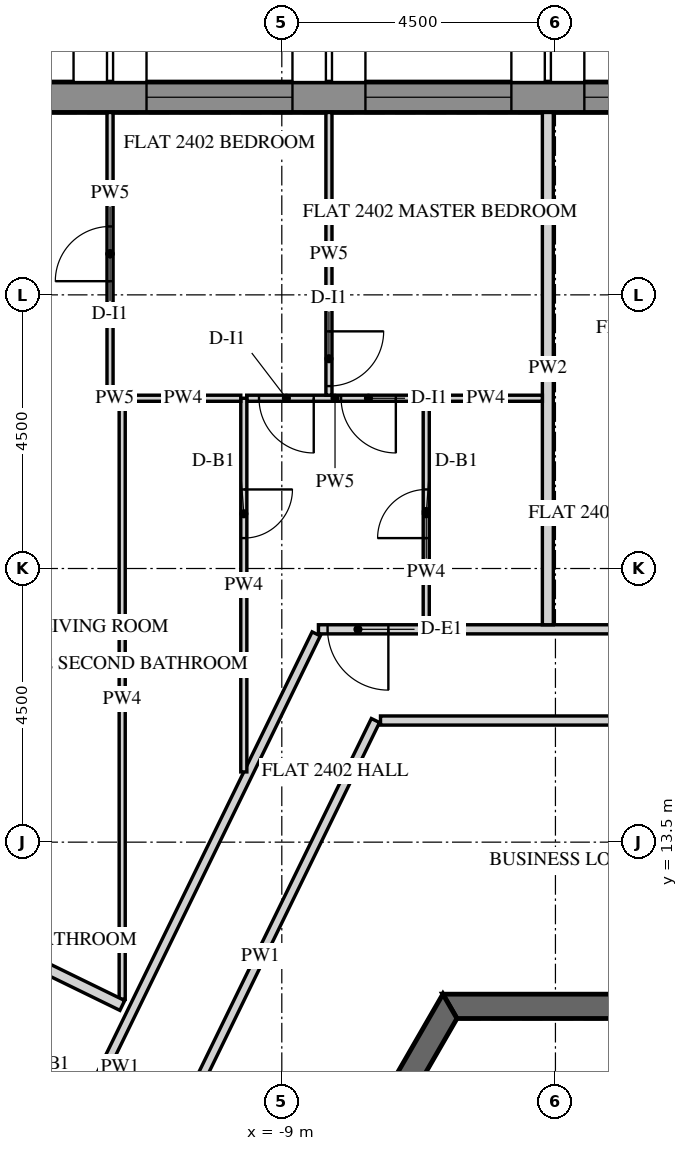
"""IFC4 building model, lengths in metres.
Left out: names, types, materials, properties, quantities, classifications, styles, units other than length and angle.
Written with IfcOpenShell. Run it as: python <this file> out.ifc"""

import sys

from ifc_helpers import new_model, si_unit, direction, frame, frame_2d, origin, place, context, subcontext, project, spatial, polyline, rectangle, outline, extrude, element, fill, save


model = new_model("IFC4")
c1 = context("Model", 3, precision=1e-05, world=origin(), true_north=direction((0.0, 1.0)))
c2 = subcontext(c1, "Body", "Model", "MODEL_VIEW")
j1 = project(units=[si_unit("LENGTHUNIT", "METRE"), si_unit("PLANEANGLEUNIT", "RADIAN")], contexts=[c1])
p1 = place(None, origin())
s1 = spatial("IfcSite", under=j1, at=p1, CompositionType="ELEMENT")
p2 = place(p1, origin())
s2 = spatial("IfcBuilding", under=s1, at=p2, CompositionType="ELEMENT")
p3 = place(p2, frame((0.0, 0.0, 303.0)))
s3 = spatial("IfcBuildingStorey", under=s2, at=p3, CompositionType="ELEMENT", Elevation=303.0)
p4 = place(p3, frame((11.698, 25.75, -0.15), z_axis=(0.0, 0.0, 1.0), x_axis=(-1.0, 0.0, 0.0)))
e1 = element("IfcWall", 1, at=p4, inside=s3, PredefinedType="SOLIDWALL", context=c2, shape_type="SweptSolid", body=[
    extrude(outline(polyline([(-0.021, -0.25), (25.468, -0.25), (25.421, 0.25), (0.021, 0.25), (-0.021, -0.25)])), origin(), (0.0, 0.0, 1.0), 3.9),
])
p5 = place(p4, frame((2.522, 0.0, 0.75)))
e2 = element("IfcOpeningElement", 2, at=p5, cuts=e1, PredefinedType="OPENING", context=c2, shape_type="SweptSolid", body=[
    extrude(rectangle(XDim=2.4, YDim=2.7, at=frame_2d((1.2, 1.35))), frame((0.0, 0.26, 0.0), z_axis=(0.0, -1.0, 0.0), x_axis=(1.0, 0.0, 0.0)), (0.0, 0.0, 1.0), 0.52),
])
p6 = place(p4, frame((6.122, 0.0, 0.75)))
e3 = element("IfcOpeningElement", 3, at=p6, cuts=e1, PredefinedType="OPENING", context=c2, shape_type="SweptSolid", body=[
    extrude(rectangle(XDim=2.4, YDim=2.7, at=frame_2d((1.2, 1.35))), frame((0.0, 0.26, 0.0), z_axis=(0.0, -1.0, 0.0), x_axis=(1.0, 0.0, 0.0)), (0.0, 0.0, 1.0), 0.52),
])
p7 = place(p4, frame((9.722, 0.0, 0.75)))
e4 = element("IfcOpeningElement", 4, at=p7, cuts=e1, PredefinedType="OPENING", context=c2, shape_type="SweptSolid", body=[
    extrude(rectangle(XDim=2.4, YDim=2.7, at=frame_2d((1.2, 1.35))), frame((0.0, 0.26, 0.0), z_axis=(0.0, -1.0, 0.0), x_axis=(1.0, 0.0, 0.0)), (0.0, 0.0, 1.0), 0.52),
])
p8 = place(p4, frame((13.323, 0.0, 0.75)))
e5 = element("IfcOpeningElement", 5, at=p8, cuts=e1, PredefinedType="OPENING", context=c2, shape_type="SweptSolid", body=[
    extrude(rectangle(XDim=2.4, YDim=2.7, at=frame_2d((1.2, 1.35))), frame((0.0, 0.26, 0.0), z_axis=(0.0, -1.0, 0.0), x_axis=(1.0, 0.0, 0.0)), (0.0, 0.0, 1.0), 0.52),
])
p9 = place(p4, frame((16.922, 0.0, 0.75)))
e6 = element("IfcOpeningElement", 6, at=p9, cuts=e1, PredefinedType="OPENING", context=c2, shape_type="SweptSolid", body=[
    extrude(rectangle(XDim=2.4, YDim=2.7, at=frame_2d((1.2, 1.35))), frame((0.0, 0.26, 0.0), z_axis=(0.0, -1.0, 0.0), x_axis=(1.0, 0.0, 0.0)), (0.0, 0.0, 1.0), 0.52),
])
p10 = place(p4, frame((20.522, 0.0, 0.75)))
e7 = element("IfcOpeningElement", 7, at=p10, cuts=e1, PredefinedType="OPENING", context=c2, shape_type="SweptSolid", body=[
    extrude(rectangle(XDim=2.4, YDim=2.7, at=frame_2d((1.2, 1.35))), frame((0.0, 0.26, 0.0), z_axis=(0.0, -1.0, 0.0), x_axis=(1.0, 0.0, 0.0)), (0.0, 0.0, 1.0), 0.52),
])
p11 = place(p3, frame((-6.235, 10.8, -0.15), z_axis=(0.0, 0.0, 1.0), x_axis=(-0.499996419489, -0.866027470984, 0.0)))
e8 = element("IfcWall", 8, at=p11, inside=s3, PredefinedType="SHEAR", context=c2, shape_type="SweptSolid", body=[
    extrude(outline(polyline([(-0.115, -0.2), (12.586, -0.2), (12.355, 0.2), (0.115, 0.2), (-0.115, -0.2)])), origin(), (0.0, 0.0, 1.0), 3.9),
])
p12 = place(p11, frame((5.364, 0.0, 0.15)))
e9 = element("IfcOpeningElement", 9, at=p12, cuts=e8, PredefinedType="OPENING", context=c2, shape_type="SweptSolid", body=[
    extrude(rectangle(XDim=1.8, YDim=2.4, at=frame_2d((0.9, 1.2))), frame((0.0, 0.21, 0.0), z_axis=(0.0, -1.0, 0.0), x_axis=(1.0, 0.0, 0.0)), (0.0, 0.0, 1.0), 0.42),
])
p13 = place(p3, frame((6.235, 10.8, -0.15), z_axis=(0.0, 0.0, 1.0), x_axis=(-1.0, 0.0, 0.0)))
e10 = element("IfcWall", 10, at=p13, inside=s3, PredefinedType="SHEAR", context=c2, shape_type="SweptSolid", body=[
    extrude(outline(polyline([(-0.115, -0.2), (12.586, -0.2), (12.355, 0.2), (0.115, 0.2), (-0.115, -0.2)])), origin(), (0.0, 0.0, 1.0), 3.9),
])
p14 = place(p3, frame((6.552, 17.0, 0.0), z_axis=(0.0, 0.0, 1.0), x_axis=(-1.0, 0.0, 0.0)))
e11 = element("IfcWall", 11, at=p14, inside=s3, PredefinedType="PARTITIONING", context=c2, shape_type="SweptSolid", body=[
    extrude(rectangle(XDim=14.949, YDim=0.15, at=frame_2d((7.475, 0.0))), origin(), (0.0, 0.0, 1.0), 2.988),
])
p15 = place(p14, frame((2.725, 0.0, 0.0)))
e12 = element("IfcOpeningElement", 12, at=p15, cuts=e11, PredefinedType="OPENING", context=c2, shape_type="SweptSolid", body=[
    extrude(rectangle(XDim=1.0, YDim=2.1, at=frame_2d((0.5, 1.05))), frame((0.0, 0.085, 0.0), z_axis=(0.0, -1.0, 0.0), x_axis=(1.0, 0.0, 0.0)), (0.0, 0.0, 1.0), 0.17),
])
p16 = place(p14, frame((13.799, 0.0, 0.0)))
e13 = element("IfcOpeningElement", 13, at=p16, cuts=e11, PredefinedType="OPENING", context=c2, shape_type="SweptSolid", body=[
    extrude(rectangle(XDim=1.0, YDim=2.1, at=frame_2d((0.5, 1.05))), frame((0.0, 0.085, 0.0), z_axis=(0.0, -1.0, 0.0), x_axis=(1.0, 0.0, 0.0)), (0.0, 0.0, 1.0), 0.17),
])
p17 = place(p3, frame((-8.434, 16.925, 0.0), z_axis=(0.0, 0.0, 1.0), x_axis=(-0.438371383278, -0.898793930956, 0.0)))
e14 = element("IfcWall", 14, at=p17, inside=s3, PredefinedType="PARTITIONING", context=c2, shape_type="SweptSolid", body=[
    extrude(rectangle(XDim=16.939, YDim=0.15, at=frame_2d((8.47, 0.0))), origin(), (0.0, 0.0, 1.0), 2.988),
])
p18 = place(p17, frame((9.89, 0.0, 0.0)))
e15 = element("IfcOpeningElement", 15, at=p18, cuts=e14, PredefinedType="OPENING", context=c2, shape_type="SweptSolid", body=[
    extrude(rectangle(XDim=1.0, YDim=2.1, at=frame_2d((0.5, 1.05))), frame((0.0, 0.085, 0.0), z_axis=(0.0, -1.0, 0.0), x_axis=(1.0, 0.0, 0.0)), (0.0, 0.0, 1.0), 0.17),
])
p19 = place(p3, frame((-11.238, 7.754, 0.0), z_axis=(0.0, 0.0, 1.0), x_axis=(0.438387352899, 0.89878614187, 0.0)))
e16 = element("IfcWall", 16, at=p19, inside=s3, PredefinedType="PARTITIONING", context=c2, shape_type="SweptSolid", body=[
    extrude(rectangle(XDim=8.618, YDim=0.15, at=frame_2d((4.309, 0.0))), origin(), (0.0, 0.0, 1.0), 2.988),
])
p20 = place(p3, frame((-7.377, 15.5, 0.0), z_axis=(0.0, 0.0, 1.0), x_axis=(1.0, 0.0, 0.0)))
e17 = element("IfcWall", 17, at=p20, inside=s3, PredefinedType="PARTITIONING", context=c2, shape_type="SweptSolid", body=[
    extrude(rectangle(XDim=13.206, YDim=0.15, at=frame_2d((6.603, 0.0))), origin(), (0.0, 0.0, 1.0), 2.988),
])
p21 = place(p20, frame((6.153, 0.0, 0.0)))
e18 = element("IfcOpeningElement", 18, at=p21, cuts=e17, PredefinedType="OPENING", context=c2, shape_type="SweptSolid", body=[
    extrude(rectangle(XDim=0.9, YDim=2.1, at=frame_2d((0.45, 1.05))), frame((0.0, 0.085, 0.0), z_axis=(0.0, -1.0, 0.0), x_axis=(1.0, 0.0, 0.0)), (0.0, 0.0, 1.0), 0.17),
])
p22 = place(p3, frame((-4.625, 25.5, 0.0), z_axis=(0.0, 0.0, 1.0), x_axis=(0.0, -1.0, 0.0)))
e19 = element("IfcWall", 19, at=p22, inside=s3, PredefinedType="PARTITIONING", context=c2, shape_type="SweptSolid", body=[
    extrude(rectangle(XDim=8.425, YDim=0.18, at=frame_2d((4.212, 0.0))), origin(), (0.0, 0.0, 1.0), 2.988),
])
p23 = place(p3, frame((-11.673, 20.8, 0.0), z_axis=(0.0, 0.0, 1.0), x_axis=(-1.0, 0.0, 0.0)))
e20 = element("IfcWall", 20, at=p23, inside=s3, PredefinedType="PARTITIONING", context=c2, shape_type="SweptSolid", body=[
    extrude(rectangle(XDim=0.152, YDim=0.1, at=frame_2d((0.076, 0.0))), origin(), (0.0, 0.0, 1.0), 2.988),
])
p24 = place(p3, frame((-11.825, 20.85, 0.0), z_axis=(0.0, 0.0, 1.0), x_axis=(0.0, 1.0, 0.0)))
e21 = element("IfcWall", 21, at=p24, inside=s3, PredefinedType="PARTITIONING", context=c2, shape_type="SweptSolid", body=[
    extrude(rectangle(XDim=4.65, YDim=0.1, at=frame_2d((2.325, 0.0))), origin(), (0.0, 0.0, 1.0), 2.988),
])
p25 = place(p24, frame((1.875, 0.0, 0.0)))
e22 = element("IfcOpeningElement", 22, at=p25, cuts=e21, PredefinedType="OPENING", context=c2, shape_type="SweptSolid", body=[
    extrude(rectangle(XDim=0.9, YDim=2.1, at=frame_2d((0.45, 1.05))), frame((0.0, 0.06, 0.0), z_axis=(0.0, -1.0, 0.0), x_axis=(1.0, 0.0, 0.0)), (0.0, 0.0, 1.0), 0.12),
])
p26 = place(p3, frame((-11.625, 10.915, 0.0), z_axis=(0.0, 0.0, 1.0), x_axis=(0.0, 1.0, 0.0)))
e23 = element("IfcWall", 23, at=p26, inside=s3, PredefinedType="PARTITIONING", context=c2, shape_type="SweptSolid", body=[
    extrude(rectangle(XDim=9.885, YDim=0.1, at=frame_2d((4.942, 0.0))), origin(), (0.0, 0.0, 1.0), 2.988),
])
p27 = place(p3, frame((-19.094, 14.458, 0.0), z_axis=(0.0, 0.0, 1.0), x_axis=(0.898789332666, -0.438380811038, 0.0)))
e24 = element("IfcWall", 24, at=p27, inside=s3, PredefinedType="PARTITIONING", context=c2, shape_type="SweptSolid", body=[
    extrude(rectangle(XDim=8.312, YDim=0.18, at=frame_2d((4.156, 0.0))), origin(), (0.0, 0.0, 1.0), 2.988),
])
p28 = place(p3, frame((-6.625, 17.075, 0.0), z_axis=(0.0, 0.0, 1.0), x_axis=(0.0, 1.0, 0.0)))
e25 = element("IfcWall", 25, at=p28, inside=s3, PredefinedType="PARTITIONING", context=c2, shape_type="SweptSolid", body=[
    extrude(rectangle(XDim=3.725, YDim=0.1, at=frame_2d((1.863, 0.0))), origin(), (0.0, 0.0, 1.0), 2.988),
])
p29 = place(p28, frame((1.425, 0.0, 0.0)))
e26 = element("IfcOpeningElement", 26, at=p29, cuts=e25, PredefinedType="OPENING", context=c2, shape_type="SweptSolid", body=[
    extrude(rectangle(XDim=0.8, YDim=2.1, at=frame_2d((0.4, 1.05))), frame((0.0, 0.06, 0.0), z_axis=(0.0, -1.0, 0.0), x_axis=(1.0, 0.0, 0.0)), (0.0, 0.0, 1.0), 0.12),
])
p30 = place(p3, frame((-6.673, 20.8, 0.0), z_axis=(0.0, 0.0, 1.0), x_axis=(-1.0, 0.0, 0.0)))
e27 = element("IfcWall", 27, at=p30, inside=s3, PredefinedType="PARTITIONING", context=c2, shape_type="SweptSolid", body=[
    extrude(rectangle(XDim=2.904, YDim=0.1, at=frame_2d((1.452, 0.0))), origin(), (0.0, 0.0, 1.0), 2.988),
])
p31 = place(p30, frame((0.452, 0.0, 0.0)))
e28 = element("IfcOpeningElement", 28, at=p31, cuts=e27, PredefinedType="OPENING", context=c2, shape_type="SweptSolid", body=[
    extrude(rectangle(XDim=0.9, YDim=2.1, at=frame_2d((0.45, 1.05))), frame((0.0, 0.06, 0.0), z_axis=(0.0, -1.0, 0.0), x_axis=(1.0, 0.0, 0.0)), (0.0, 0.0, 1.0), 0.12),
])
p32 = place(p30, frame((1.802, 0.0, 0.0)))
e29 = element("IfcOpeningElement", 29, at=p32, cuts=e27, PredefinedType="OPENING", context=c2, shape_type="SweptSolid", body=[
    extrude(rectangle(XDim=0.9, YDim=2.1, at=frame_2d((0.45, 1.05))), frame((0.0, 0.06, 0.0), z_axis=(0.0, -1.0, 0.0), x_axis=(1.0, 0.0, 0.0)), (0.0, 0.0, 1.0), 0.12),
])
p33 = place(p3, frame((-9.625, 20.8, 0.0), z_axis=(0.0, 0.0, 1.0), x_axis=(0.0, -1.0, 0.0)))
e30 = element("IfcWall", 30, at=p33, inside=s3, PredefinedType="PARTITIONING", context=c2, shape_type="SweptSolid", body=[
    extrude(rectangle(XDim=6.145, YDim=0.1, at=frame_2d((3.073, 0.0))), origin(), (0.0, 0.0, 1.0), 2.988),
])
p34 = place(p33, frame((1.5, 0.0, 0.0)))
e31 = element("IfcOpeningElement", 31, at=p34, cuts=e30, PredefinedType="OPENING", context=c2, shape_type="SweptSolid", body=[
    extrude(rectangle(XDim=0.8, YDim=2.1, at=frame_2d((0.4, 1.05))), frame((0.0, 0.06, 0.0), z_axis=(0.0, -1.0, 0.0), x_axis=(1.0, 0.0, 0.0)), (0.0, 0.0, 1.0), 0.12),
])
p35 = place(p3, frame((-4.715, 20.8, 0.0), z_axis=(0.0, 0.0, 1.0), x_axis=(-1.0, 0.0, 0.0)))
e32 = element("IfcWall", 32, at=p35, inside=s3, PredefinedType="PARTITIONING", context=c2, shape_type="SweptSolid", body=[
    extrude(rectangle(XDim=1.862, YDim=0.1, at=frame_2d((0.931, 0.0))), origin(), (0.0, 0.0, 1.0), 2.988),
])
p36 = place(p3, frame((-8.225, 25.5, 0.0), z_axis=(0.0, 0.0, 1.0), x_axis=(0.0, -1.0, 0.0)))
e33 = element("IfcWall", 33, at=p36, inside=s3, PredefinedType="PARTITIONING", context=c2, shape_type="SweptSolid", body=[
    extrude(rectangle(XDim=4.65, YDim=0.1, at=frame_2d((2.325, 0.0))), origin(), (0.0, 0.0, 1.0), 2.988),
])
p37 = place(p36, frame((3.6, 0.0, 0.0)))
e34 = element("IfcOpeningElement", 34, at=p37, cuts=e33, PredefinedType="OPENING", context=c2, shape_type="SweptSolid", body=[
    extrude(rectangle(XDim=0.9, YDim=2.1, at=frame_2d((0.45, 1.05))), frame((0.0, 0.06, 0.0), z_axis=(0.0, -1.0, 0.0), x_axis=(1.0, 0.0, 0.0)), (0.0, 0.0, 1.0), 0.12),
])
p38 = place(p3, frame((-11.575, 20.8, 0.0), z_axis=(0.0, 0.0, 1.0), x_axis=(1.0, 0.0, 0.0)))
e35 = element("IfcWall", 35, at=p38, inside=s3, PredefinedType="PARTITIONING", context=c2, shape_type="SweptSolid", body=[
    extrude(rectangle(XDim=1.9, YDim=0.1, at=frame_2d((0.95, 0.0))), origin(), (0.0, 0.0, 1.0), 2.988),
])
p39 = place(p3, frame((-12.399, 8.968, 0.0), z_axis=(0.0, 0.0, 1.0), x_axis=(-0.898787215731, 0.438385151252, 0.0)))
e36 = element("IfcWall", 36, at=p39, inside=s3, PredefinedType="PARTITIONING", context=c2, shape_type="SweptSolid", body=[
    extrude(rectangle(XDim=4.125, YDim=0.1, at=frame_2d((2.062, 0.0))), origin(), (0.0, 0.0, 1.0), 2.988),
])
p40 = place(p39, frame((1.625, 0.0, 0.0)))
e37 = element("IfcOpeningElement", 37, at=p40, cuts=e36, PredefinedType="OPENING", context=c2, shape_type="SweptSolid", body=[
    extrude(rectangle(XDim=0.8, YDim=2.1, at=frame_2d((0.4, 1.05))), frame((0.0, 0.06, 0.0), z_axis=(0.0, -1.0, 0.0), x_axis=(1.0, 0.0, 0.0)), (0.0, 0.0, 1.0), 0.12),
])
p41 = place(p8, frame((0.0, 0.18, 0.0)))
e38 = element("IfcWindow", 38, at=p41, inside=s3, PartitioningType="DOUBLE_PANEL_VERTICAL", PredefinedType="WINDOW", context=c2, shape_type="SweptSolid", body=[
    extrude(rectangle(XDim=2.4, YDim=2.7, at=frame_2d((1.2, 1.35))), frame((0.0, 0.03, 0.0), z_axis=(0.0, -1.0, 0.0), x_axis=(1.0, 0.0, 0.0)), (0.0, 0.0, 1.0), 0.06),
])
fill(e5, e38)
p42 = place(p9, frame((0.0, 0.18, 0.0)))
e39 = element("IfcWindow", 39, at=p42, inside=s3, PartitioningType="DOUBLE_PANEL_VERTICAL", PredefinedType="WINDOW", context=c2, shape_type="SweptSolid", body=[
    extrude(rectangle(XDim=2.4, YDim=2.7, at=frame_2d((1.2, 1.35))), frame((0.0, 0.03, 0.0), z_axis=(0.0, -1.0, 0.0), x_axis=(1.0, 0.0, 0.0)), (0.0, 0.0, 1.0), 0.06),
])
fill(e6, e39)
p43 = place(p10, frame((0.0, 0.18, 0.0)))
e40 = element("IfcWindow", 40, at=p43, inside=s3, PartitioningType="DOUBLE_PANEL_VERTICAL", PredefinedType="WINDOW", context=c2, shape_type="SweptSolid", body=[
    extrude(rectangle(XDim=2.4, YDim=2.7, at=frame_2d((1.2, 1.35))), frame((0.0, 0.03, 0.0), z_axis=(0.0, -1.0, 0.0), x_axis=(1.0, 0.0, 0.0)), (0.0, 0.0, 1.0), 0.06),
])
fill(e7, e40)
p44 = place(p16, origin())
e41 = element("IfcDoor", 41, at=p44, inside=s3, OperationType="SINGLE_SWING_LEFT", PredefinedType="DOOR", context=c2, shape_type="SweptSolid", body=[
    extrude(rectangle(XDim=1.0, YDim=2.1, at=frame_2d((0.5, 1.05))), frame((0.0, 0.025, 0.0), z_axis=(0.0, -1.0, 0.0), x_axis=(1.0, 0.0, 0.0)), (0.0, 0.0, 1.0), 0.05),
])
fill(e13, e41)
p45 = place(p29, origin())
e42 = element("IfcDoor", 42, at=p45, inside=s3, OperationType="SINGLE_SWING_RIGHT", PredefinedType="DOOR", context=c2, shape_type="SweptSolid", body=[
    extrude(rectangle(XDim=0.8, YDim=2.1, at=frame_2d((0.4, 1.05))), frame((0.0, 0.025, 0.0), z_axis=(0.0, -1.0, 0.0), x_axis=(1.0, 0.0, 0.0)), (0.0, 0.0, 1.0), 0.05),
])
fill(e26, e42)
p46 = place(p31, origin())
e43 = element("IfcDoor", 43, at=p46, inside=s3, OperationType="SINGLE_SWING_LEFT", PredefinedType="DOOR", context=c2, shape_type="SweptSolid", body=[
    extrude(rectangle(XDim=0.9, YDim=2.1, at=frame_2d((0.45, 1.05))), frame((0.0, 0.025, 0.0), z_axis=(0.0, -1.0, 0.0), x_axis=(1.0, 0.0, 0.0)), (0.0, 0.0, 1.0), 0.05),
])
fill(e28, e43)
p47 = place(p37, origin())
e44 = element("IfcDoor", 44, at=p47, inside=s3, OperationType="SINGLE_SWING_RIGHT", PredefinedType="DOOR", context=c2, shape_type="SweptSolid", body=[
    extrude(rectangle(XDim=0.9, YDim=2.1, at=frame_2d((0.45, 1.05))), frame((0.0, 0.025, 0.0), z_axis=(0.0, -1.0, 0.0), x_axis=(1.0, 0.0, 0.0)), (0.0, 0.0, 1.0), 0.05),
])
fill(e34, e44)
p48 = place(p32, origin())
e45 = element("IfcDoor", 45, at=p48, inside=s3, OperationType="SINGLE_SWING_LEFT", PredefinedType="DOOR", context=c2, shape_type="SweptSolid", body=[
    extrude(rectangle(XDim=0.9, YDim=2.1, at=frame_2d((0.45, 1.05))), frame((0.0, 0.025, 0.0), z_axis=(0.0, -1.0, 0.0), x_axis=(1.0, 0.0, 0.0)), (0.0, 0.0, 1.0), 0.05),
])
fill(e29, e45)
p49 = place(p34, origin())
e46 = element("IfcDoor", 46, at=p49, inside=s3, OperationType="SINGLE_SWING_RIGHT", PredefinedType="DOOR", context=c2, shape_type="SweptSolid", body=[
    extrude(rectangle(XDim=0.8, YDim=2.1, at=frame_2d((0.4, 1.05))), frame((0.0, 0.025, 0.0), z_axis=(0.0, -1.0, 0.0), x_axis=(1.0, 0.0, 0.0)), (0.0, 0.0, 1.0), 0.05),
])
fill(e31, e46)
p50 = place(p25, origin())
e47 = element("IfcDoor", 47, at=p50, inside=s3, OperationType="SINGLE_SWING_LEFT", PredefinedType="DOOR", context=c2, shape_type="SweptSolid", body=[
    extrude(rectangle(XDim=0.9, YDim=2.1, at=frame_2d((0.45, 1.05))), frame((0.0, 0.025, 0.0), z_axis=(0.0, -1.0, 0.0), x_axis=(1.0, 0.0, 0.0)), (0.0, 0.0, 1.0), 0.05),
])
fill(e22, e47)
save(model, sys.argv[1])
